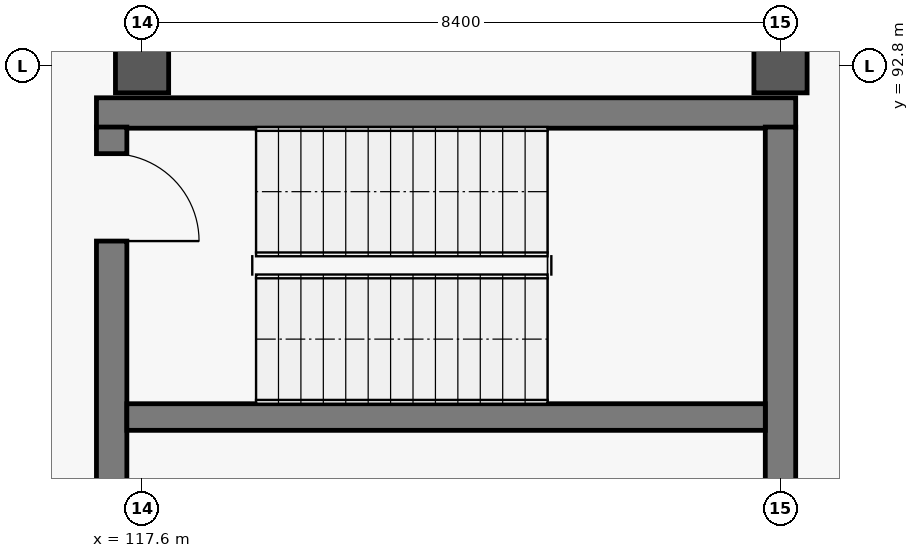
"""IFC4 building model, lengths in metres.
Left out: names, types, materials, properties, quantities, classifications, styles, units other than length and angle.
Written with IfcOpenShell. Run it as: python <this file> out.ifc"""

import sys

from ifc_helpers import new_model, si_unit, direction, frame, frame_2d, origin, origin_2d, place, context, subcontext, project, spatial, rectangle, extrude, element, fill, save


model = new_model("IFC4")
c1 = context("Model", 3, precision=1e-05, world=origin(), true_north=direction((0.0, 1.0)))
c2 = subcontext(c1, "Body", "Model", "MODEL_VIEW")
j1 = project(units=[si_unit("LENGTHUNIT", "METRE"), si_unit("PLANEANGLEUNIT", "RADIAN")], contexts=[c1])
p1 = place(None, origin())
s1 = spatial("IfcSite", under=j1, at=p1, CompositionType="ELEMENT")
p2 = place(p1, origin())
s2 = spatial("IfcBuilding", under=s1, at=p2, CompositionType="ELEMENT")
p3 = place(p2, frame((0.0, 0.0, -4.8)))
s3 = spatial("IfcBuildingStorey", under=s2, at=p3, CompositionType="ELEMENT", Elevation=-4.8)
for number, where, z_axis, x_axis in (
    (1, (117.6, 92.8, 0.0), (0.0, 0.0, 1.0), (1.0, 0.0, 0.0)),
    (2, (126.0, 92.8, 0.0), (0.0, 0.0, 1.0), (1.0, 0.0, 0.0)),
):
    element("IfcColumn", number, at=place(p3, frame(where, z_axis=z_axis, x_axis=x_axis)), inside=s3, PredefinedType="COLUMN", context=c2, shape_type="SweptSolid", body=[
        extrude(rectangle(XDim=0.7, YDim=0.7, at=origin_2d()), origin(), (0.0, 0.0, 1.0), 4.8),
    ])
p4 = place(p3, frame((126.2, 92.185, 0.0), z_axis=(0.0, 0.0, 1.0), x_axis=(-1.0, 0.0, 0.0)))
e3 = element("IfcWall", 3, at=p4, inside=s3, PredefinedType="SHEAR", context=c2, shape_type="SweptSolid", body=[
    extrude(rectangle(XDim=9.2, YDim=0.4, at=frame_2d((4.6, 0.0))), origin(), (0.0, 0.0, 1.0), 4.48),
])
p5 = place(p3, frame((117.2, 92.0, 0.0), z_axis=(0.0, 0.0, 1.0), x_axis=(0.0, -1.0, 0.0)))
e4 = element("IfcWall", 4, at=p5, inside=s3, PredefinedType="SHEAR", context=c2, shape_type="SweptSolid", body=[
    extrude(rectangle(XDim=7.2, YDim=0.4, at=frame_2d((3.6, 0.0))), origin(), (0.0, 0.0, 1.0), 4.48),
])
p6 = place(p5, frame((0.35, 0.0, 0.0)))
e5 = element("IfcOpeningElement", 5, at=p6, cuts=e4, PredefinedType="OPENING", context=c2, shape_type="SweptSolid", body=[
    extrude(rectangle(XDim=1.15, YDim=2.2, at=frame_2d((0.575, 1.1))), frame((0.0, 0.21, 0.0), z_axis=(0.0, -1.0, 0.0), x_axis=(1.0, 0.0, 0.0)), (0.0, 0.0, 1.0), 0.42),
])
p7 = place(p3, frame((126.0, 84.8, 0.0), z_axis=(0.0, 0.0, 1.0), x_axis=(0.0, 1.0, 0.0)))
e6 = element("IfcWall", 6, at=p7, inside=s3, PredefinedType="SHEAR", context=c2, shape_type="SweptSolid", body=[
    extrude(rectangle(XDim=7.2, YDim=0.4, at=frame_2d((3.6, 0.0))), origin(), (0.0, 0.0, 1.0), 4.48),
])
p8 = place(p3, frame((117.4, 88.185, 0.0), z_axis=(0.0, 0.0, 1.0), x_axis=(1.0, 0.0, 0.0)))
e7 = element("IfcWall", 7, at=p8, inside=s3, PredefinedType="SHEAR", context=c2, shape_type="SweptSolid", body=[
    extrude(rectangle(XDim=8.4, YDim=0.35, at=frame_2d((4.2, 0.0))), origin(), (0.0, 0.0, 1.0), 4.48),
])
p9 = place(p6, origin())
e8 = element("IfcDoor", 8, at=p9, inside=s3, OperationType="SINGLE_SWING_RIGHT", PredefinedType="DOOR", context=c2, shape_type="SweptSolid", body=[
    extrude(rectangle(XDim=1.15, YDim=2.2, at=frame_2d((0.575, 1.1))), frame((0.0, 0.025, 0.0), z_axis=(0.0, -1.0, 0.0), x_axis=(1.0, 0.0, 0.0)), (0.0, 0.0, 1.0), 0.05),
])
fill(e5, e8)
save(model, sys.argv[1])
